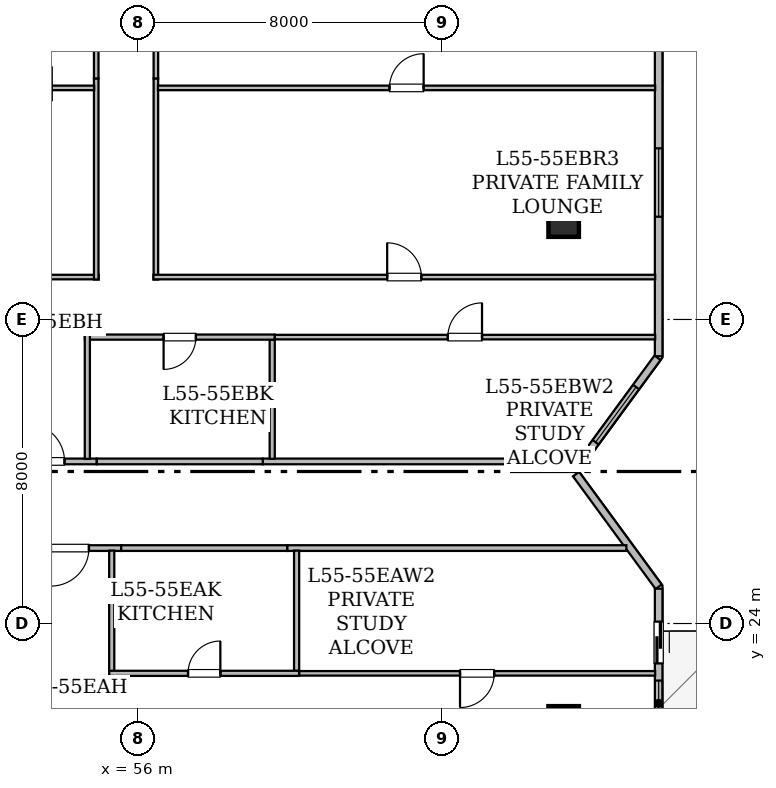
"""IFC4 building model, lengths in metres.
Left out: names, types, materials, properties, quantities, classifications, styles, units other than length and angle.
Written with IfcOpenShell. Run it as: python <this file> out.ifc"""

import sys

from ifc_helpers import new_model, si_unit, direction, frame, frame_2d, origin, origin_2d, place, context, subcontext, project, spatial, rectangle, hollow_rectangle, extrude, element, fill, save


model = new_model("IFC4")
c1 = context("Model", 3, precision=1e-05, world=origin(), true_north=direction((0.0, 1.0)))
c2 = subcontext(c1, "Body", "Model", "MODEL_VIEW")
j1 = project(units=[si_unit("LENGTHUNIT", "METRE"), si_unit("PLANEANGLEUNIT", "RADIAN")], contexts=[c1])
p1 = place(None, origin())
s1 = spatial("IfcSite", under=j1, at=p1, CompositionType="ELEMENT")
p2 = place(p1, origin())
s2 = spatial("IfcBuilding", under=s1, at=p2, CompositionType="ELEMENT")
p3 = place(p2, frame((0.0, 0.0, 217.2)))
s3 = spatial("IfcBuildingStorey", under=s2, at=p3, CompositionType="ELEMENT", Elevation=217.2)
for number, where, z_axis, x_axis in (
    (1, (67.2, 21.425, 0.025), (0.0, 0.0, 1.0), (1.0, 0.0, 0.0)),
    (2, (67.2, 34.575, 0.025), (0.0, 0.0, 1.0), (1.0, 0.0, 0.0)),
):
    element("IfcColumn", number, at=place(p3, frame(where, z_axis=z_axis, x_axis=x_axis)), inside=s3, PredefinedType="COLUMN", context=c2, shape_type="SweptSolid", body=[
        extrude(hollow_rectangle(XDim=0.8, YDim=0.8, WallThickness=0.04, at=origin_2d()), origin(), (0.0, 0.0, 1.0), 3.625),
    ])
p4 = place(p3, frame((69.7, 39.896, 0.0), z_axis=(0.0, 0.0, 1.0), x_axis=(0.0, -1.0, 0.0)))
e3 = element("IfcWall", 3, at=p4, inside=s3, PredefinedType="STANDARD", context=c2, shape_type="SweptSolid", body=[
    extrude(rectangle(XDim=8.863, YDim=0.2, at=frame_2d((4.432, 0.0))), origin(), (0.0, 0.0, 1.0), 3.43),
])
p5 = place(p4, frame((3.392, 0.0, 0.85)))
e4 = element("IfcOpeningElement", 4, at=p5, cuts=e3, PredefinedType="OPENING", context=c2, shape_type="SweptSolid", body=[
    extrude(rectangle(XDim=1.8, YDim=0.92, at=frame_2d((0.9, 0.46))), frame((0.0, 0.11, 0.0), z_axis=(0.0, -1.0, 0.0), x_axis=(1.0, 0.0, 0.0)), (0.0, 0.0, 1.0), 0.22),
])
p6 = place(p3, frame((69.67, 30.992, 0.0), z_axis=(0.0, 0.0, 1.0), x_axis=(-0.591320870733, -0.806436375566, 0.0)))
e5 = element("IfcWall", 5, at=p6, inside=s3, PredefinedType="STANDARD", context=c2, shape_type="SweptSolid", body=[
    extrude(rectangle(XDim=3.71, YDim=0.2, at=frame_2d((1.855, 0.0))), origin(), (0.0, 0.0, 1.0), 3.43),
])
p7 = place(p6, frame((0.955, 0.0, 0.85)))
e6 = element("IfcOpeningElement", 6, at=p7, cuts=e5, PredefinedType="OPENING", context=c2, shape_type="SweptSolid", body=[
    extrude(rectangle(XDim=1.8, YDim=0.92, at=frame_2d((0.9, 0.46))), frame((0.0, 0.11, 0.0), z_axis=(0.0, -1.0, 0.0), x_axis=(1.0, 0.0, 0.0)), (0.0, 0.0, 1.0), 0.22),
])
p8 = place(p3, frame((67.527, 27.931, 0.0), z_axis=(0.0, 0.0, 1.0), x_axis=(0.591248456881, -0.80648946815, 0.0)))
e7 = element("IfcWall", 7, at=p8, inside=s3, PredefinedType="STANDARD", context=c2, shape_type="SweptSolid", body=[
    extrude(rectangle(XDim=3.675, YDim=0.2, at=frame_2d((1.837, 0.0))), origin(), (0.0, 0.0, 1.0), 3.43),
])
p9 = place(p3, frame((69.7, 24.916, 0.0), z_axis=(0.0, 0.0, 1.0), x_axis=(0.0, -1.0, 0.0)))
e8 = element("IfcWall", 8, at=p9, inside=s3, PredefinedType="STANDARD", context=c2, shape_type="SweptSolid", body=[
    extrude(rectangle(XDim=8.875, YDim=0.2, at=frame_2d((4.438, 0.0))), origin(), (0.0, 0.0, 1.0), 3.43),
])
p10 = place(p9, frame((0.866, 0.0, 0.0)))
e9 = element("IfcOpeningElement", 9, at=p10, cuts=e8, PredefinedType="OPENING", context=c2, shape_type="SweptSolid", body=[
    extrude(rectangle(XDim=1.1, YDim=2.2, at=frame_2d((0.55, 1.1))), frame((0.0, 0.11, 0.0), z_axis=(0.0, -1.0, 0.0), x_axis=(1.0, 0.0, 0.0)), (0.0, 0.0, 1.0), 0.22),
])
p11 = place(p9, frame((2.417, 0.0, 0.78)))
e10 = element("IfcOpeningElement", 10, at=p11, cuts=e8, PredefinedType="OPENING", context=c2, shape_type="SweptSolid", body=[
    extrude(rectangle(XDim=1.2, YDim=1.5, at=frame_2d((0.6, 0.75))), frame((0.0, 0.11, 0.0), z_axis=(0.0, -1.0, 0.0), x_axis=(1.0, 0.0, 0.0)), (0.0, 0.0, 1.0), 0.22),
])
p12 = place(p9, frame((4.619, 0.0, 0.85)))
e11 = element("IfcOpeningElement", 11, at=p12, cuts=e8, PredefinedType="OPENING", context=c2, shape_type="SweptSolid", body=[
    extrude(rectangle(XDim=1.8, YDim=0.92, at=frame_2d((0.9, 0.46))), frame((0.0, 0.11, 0.0), z_axis=(0.0, -1.0, 0.0), x_axis=(1.0, 0.0, 0.0)), (0.0, 0.0, 1.0), 0.22),
])
p13 = place(p3, frame((68.85, 25.985, 0.0), z_axis=(0.0, 0.0, 1.0), x_axis=(-1.0, 0.0, 0.0)))
e12 = element("IfcWall", 12, at=p13, inside=s3, PredefinedType="STANDARD", context=c2, shape_type="SweptSolid", body=[
    extrude(rectangle(XDim=8.926, YDim=0.15, at=frame_2d((4.463, 0.0))), origin(), (0.0, 0.0, 1.0), 2.887),
])
p14 = place(p3, frame((55.557, 25.985, 0.0), z_axis=(0.0, 0.0, 1.0), x_axis=(-1.0, 0.0, 0.0)))
e13 = element("IfcWall", 13, at=p14, inside=s3, PredefinedType="STANDARD", context=c2, shape_type="SweptSolid", body=[
    extrude(rectangle(XDim=2.698, YDim=0.15, at=frame_2d((1.349, 0.0))), origin(), (0.0, 0.0, 1.0), 2.725),
])
p15 = place(p14, frame((0.849, 0.0, 0.0)))
e14 = element("IfcOpeningElement", 14, at=p15, cuts=e13, PredefinedType="OPENING", context=c2, shape_type="SweptSolid", body=[
    extrude(rectangle(XDim=1.0, YDim=2.15, at=frame_2d((0.5, 1.075))), frame((0.0, 0.085, 0.0), z_axis=(0.0, -1.0, 0.0), x_axis=(1.0, 0.0, 0.0)), (0.0, 0.0, 1.0), 0.17),
])
p16 = place(p3, frame((59.924, 25.985, 0.0), z_axis=(0.0, 0.0, 1.0), x_axis=(-1.0, 0.0, 0.0)))
e15 = element("IfcWall", 15, at=p16, inside=s3, PredefinedType="STANDARD", context=c2, shape_type="SweptSolid", body=[
    extrude(rectangle(XDim=4.367, YDim=0.15, at=frame_2d((2.184, 0.0))), origin(), (0.0, 0.0, 1.0), 3.43),
])
p17 = place(p3, frame((59.282, 28.265, 0.0), z_axis=(0.0, 0.0, 1.0), x_axis=(1.0, 0.0, 0.0)))
e16 = element("IfcWall", 16, at=p17, inside=s3, PredefinedType="STANDARD", context=c2, shape_type="SweptSolid", body=[
    extrude(rectangle(XDim=8.285, YDim=0.15, at=frame_2d((4.143, 0.0))), origin(), (0.0, 0.0, 1.0), 2.887),
])
p18 = place(p3, frame((52.217, 28.265, 0.0), z_axis=(0.0, 0.0, 1.0), x_axis=(1.0, 0.0, 0.0)))
e17 = element("IfcWall", 17, at=p18, inside=s3, PredefinedType="STANDARD", context=c2, shape_type="SweptSolid", body=[
    extrude(rectangle(XDim=2.698, YDim=0.15, at=frame_2d((1.349, 0.0))), origin(), (0.0, 0.0, 1.0), 2.725),
])
p19 = place(p18, frame((0.849, 0.0, 0.0)))
e18 = element("IfcOpeningElement", 18, at=p19, cuts=e17, PredefinedType="OPENING", context=c2, shape_type="SweptSolid", body=[
    extrude(rectangle(XDim=1.0, YDim=2.15, at=frame_2d((0.5, 1.075))), frame((0.0, 0.085, 0.0), z_axis=(0.0, -1.0, 0.0), x_axis=(1.0, 0.0, 0.0)), (0.0, 0.0, 1.0), 0.17),
])
p20 = place(p3, frame((54.915, 28.265, 0.0), z_axis=(0.0, 0.0, 1.0), x_axis=(1.0, 0.0, 0.0)))
e19 = element("IfcWall", 19, at=p20, inside=s3, PredefinedType="STANDARD", context=c2, shape_type="SweptSolid", body=[
    extrude(rectangle(XDim=4.367, YDim=0.15, at=frame_2d((2.184, 0.0))), origin(), (0.0, 0.0, 1.0), 3.43),
])
p21 = place(p3, frame((69.608, 22.689, 0.0), z_axis=(0.0, 0.0, 1.0), x_axis=(-1.0, 0.0, 0.0)))
e20 = element("IfcWall", 20, at=p21, inside=s3, PredefinedType="PARTITIONING", context=c2, shape_type="SweptSolid", body=[
    extrude(rectangle(XDim=9.37, YDim=0.12, at=frame_2d((4.685, 0.0))), origin(), (0.0, 0.0, 1.0), 2.887),
])
p22 = place(p21, frame((4.235, 0.0, 0.0)))
e21 = element("IfcOpeningElement", 21, at=p22, cuts=e20, PredefinedType="OPENING", context=c2, shape_type="SweptSolid", body=[
    extrude(rectangle(XDim=0.9, YDim=2.1, at=frame_2d((0.45, 1.05))), frame((0.0, 0.07, 0.0), z_axis=(0.0, -1.0, 0.0), x_axis=(1.0, 0.0, 0.0)), (0.0, 0.0, 1.0), 0.14),
])
p23 = place(p3, frame((60.173, 22.754, 0.0), z_axis=(0.0, 0.0, 1.0), x_axis=(0.0, 1.0, 0.0)))
e22 = element("IfcWall", 22, at=p23, inside=s3, PredefinedType="PARTITIONING", context=c2, shape_type="SweptSolid", body=[
    extrude(rectangle(XDim=3.164, YDim=0.135, at=frame_2d((1.582, 0.0))), origin(), (0.0, 0.0, 1.0), 3.43),
])
p24 = place(p3, frame((55.308, 25.918, 0.0), z_axis=(0.0, 0.0, 1.0), x_axis=(0.0, -1.0, 0.0)))
e23 = element("IfcWall", 23, at=p24, inside=s3, PredefinedType="PARTITIONING", context=c2, shape_type="SweptSolid", body=[
    extrude(rectangle(XDim=3.294, YDim=0.135, at=frame_2d((1.647, 0.0))), origin(), (0.0, 0.0, 1.0), 3.43),
])
p25 = place(p3, frame((55.243, 22.689, 0.0), z_axis=(0.0, 0.0, 1.0), x_axis=(1.0, 0.0, 0.0)))
e24 = element("IfcWall", 24, at=p25, inside=s3, PredefinedType="PARTITIONING", context=c2, shape_type="SweptSolid", body=[
    extrude(rectangle(XDim=4.995, YDim=0.135, at=frame_2d((2.498, 0.0))), origin(), (0.0, 0.0, 1.0), 3.43),
])
p26 = place(p25, frame((2.073, 0.0, 0.0)))
e25 = element("IfcOpeningElement", 25, at=p26, cuts=e24, PredefinedType="OPENING", context=c2, shape_type="SweptSolid", body=[
    extrude(rectangle(XDim=0.85, YDim=2.1, at=frame_2d((0.425, 1.05))), frame((0.0, 0.077, 0.0), z_axis=(0.0, -1.0, 0.0), x_axis=(1.0, 0.0, 0.0)), (0.0, 0.0, 1.0), 0.155),
])
p27 = place(p3, frame((59.596, 31.536, 0.0), z_axis=(0.0, 0.0, 1.0), x_axis=(1.0, 0.0, 0.0)))
e26 = element("IfcWall", 26, at=p27, inside=s3, PredefinedType="PARTITIONING", context=c2, shape_type="SweptSolid", body=[
    extrude(rectangle(XDim=10.012, YDim=0.12, at=frame_2d((5.006, 0.0))), origin(), (0.0, 0.0, 1.0), 2.887),
])
p28 = place(p27, frame((4.556, 0.0, 0.0)))
e27 = element("IfcOpeningElement", 27, at=p28, cuts=e26, PredefinedType="OPENING", context=c2, shape_type="SweptSolid", body=[
    extrude(rectangle(XDim=0.9, YDim=2.1, at=frame_2d((0.45, 1.05))), frame((0.0, 0.07, 0.0), z_axis=(0.0, -1.0, 0.0), x_axis=(1.0, 0.0, 0.0)), (0.0, 0.0, 1.0), 0.14),
])
p29 = place(p3, frame((59.531, 28.332, 0.0), z_axis=(0.0, 0.0, 1.0), x_axis=(0.0, 1.0, 0.0)))
e28 = element("IfcWall", 28, at=p29, inside=s3, PredefinedType="PARTITIONING", context=c2, shape_type="SweptSolid", body=[
    extrude(rectangle(XDim=3.139, YDim=0.135, at=frame_2d((1.569, 0.0))), origin(), (0.0, 0.0, 1.0), 3.43),
])
p30 = place(p3, frame((59.596, 31.536, 0.0), z_axis=(0.0, 0.0, 1.0), x_axis=(-1.0, 0.0, 0.0)))
e29 = element("IfcWall", 29, at=p30, inside=s3, PredefinedType="PARTITIONING", context=c2, shape_type="SweptSolid", body=[
    extrude(rectangle(XDim=4.995, YDim=0.135, at=frame_2d((2.498, 0.0))), origin(), (0.0, 0.0, 1.0), 3.43),
])
p31 = place(p30, frame((2.073, 0.0, 0.0)))
e30 = element("IfcOpeningElement", 30, at=p31, cuts=e29, PredefinedType="OPENING", context=c2, shape_type="SweptSolid", body=[
    extrude(rectangle(XDim=0.85, YDim=2.1, at=frame_2d((0.425, 1.05))), frame((0.0, 0.077, 0.0), z_axis=(0.0, -1.0, 0.0), x_axis=(1.0, 0.0, 0.0)), (0.0, 0.0, 1.0), 0.155),
])
p32 = place(p3, frame((54.666, 31.601, 0.0), z_axis=(0.0, 0.0, 1.0), x_axis=(0.0, -1.0, 0.0)))
e31 = element("IfcWall", 31, at=p32, inside=s3, PredefinedType="PARTITIONING", context=c2, shape_type="SweptSolid", body=[
    extrude(rectangle(XDim=3.269, YDim=0.135, at=frame_2d((1.635, 0.0))), origin(), (0.0, 0.0, 1.0), 3.43),
])
p33 = place(p3, frame((41.682, 33.116, 0.0), z_axis=(0.0, 0.0, 1.0), x_axis=(1.0, 0.0, 0.0)))
e32 = element("IfcWall", 32, at=p33, inside=s3, PredefinedType="PARTITIONING", context=c2, shape_type="SweptSolid", body=[
    extrude(rectangle(XDim=13.283, YDim=0.12, at=frame_2d((6.642, 0.0))), origin(), (0.0, 0.0, 1.0), 2.725),
])
p34 = place(p33, frame((6.191, 0.0, 0.0)))
e33 = element("IfcOpeningElement", 33, at=p34, cuts=e32, PredefinedType="OPENING", context=c2, shape_type="SweptSolid", body=[
    extrude(rectangle(XDim=0.9, YDim=2.1, at=frame_2d((0.45, 1.05))), frame((0.0, 0.07, 0.0), z_axis=(0.0, -1.0, 0.0), x_axis=(1.0, 0.0, 0.0)), (0.0, 0.0, 1.0), 0.14),
])
p35 = place(p3, frame((54.9, 33.051, 0.0), z_axis=(0.0, 0.0, 1.0), x_axis=(0.0, 1.0, 0.0)))
e34 = element("IfcWall", 34, at=p35, inside=s3, PredefinedType="PARTITIONING", context=c2, shape_type="SweptSolid", body=[
    extrude(rectangle(XDim=5.291, YDim=0.12, at=frame_2d((2.646, 0.0))), origin(), (0.0, 0.0, 1.0), 2.725),
])
p36 = place(p3, frame((54.9, 38.342, 0.0), z_axis=(0.0, 0.0, 1.0), x_axis=(0.0, 1.0, 0.0)))
e35 = element("IfcWall", 35, at=p36, inside=s3, PredefinedType="PARTITIONING", context=c2, shape_type="SweptSolid", body=[
    extrude(rectangle(XDim=5.466, YDim=0.12, at=frame_2d((2.733, 0.0))), origin(), (0.0, 0.0, 1.0), 2.725),
])
p37 = place(p36, frame((2.283, 0.0, 0.0)))
e36 = element("IfcOpeningElement", 36, at=p37, cuts=e35, PredefinedType="OPENING", context=c2, shape_type="SweptSolid", body=[
    extrude(rectangle(XDim=0.9, YDim=2.1, at=frame_2d((0.45, 1.05))), frame((0.0, 0.07, 0.0), z_axis=(0.0, -1.0, 0.0), x_axis=(1.0, 0.0, 0.0)), (0.0, 0.0, 1.0), 0.14),
])
p38 = place(p3, frame((56.47, 38.342, 0.0), z_axis=(0.0, 0.0, 1.0), x_axis=(0.0, -1.0, 0.0)))
e37 = element("IfcWall", 37, at=p38, inside=s3, PredefinedType="PARTITIONING", context=c2, shape_type="SweptSolid", body=[
    extrude(rectangle(XDim=5.291, YDim=0.12, at=frame_2d((2.646, 0.0))), origin(), (0.0, 0.0, 1.0), 2.725),
])
p39 = place(p3, frame((56.405, 33.116, 0.0), z_axis=(0.0, 0.0, 1.0), x_axis=(1.0, 0.0, 0.0)))
e38 = element("IfcWall", 38, at=p39, inside=s3, PredefinedType="PARTITIONING", context=c2, shape_type="SweptSolid", body=[
    extrude(rectangle(XDim=13.203, YDim=0.12, at=frame_2d((6.602, 0.0))), origin(), (0.0, 0.0, 1.0), 2.887),
])
p40 = place(p39, frame((6.151, 0.0, 0.0)))
e39 = element("IfcOpeningElement", 39, at=p40, cuts=e38, PredefinedType="OPENING", context=c2, shape_type="SweptSolid", body=[
    extrude(rectangle(XDim=0.9, YDim=2.1, at=frame_2d((0.45, 1.05))), frame((0.0, 0.07, 0.0), z_axis=(0.0, -1.0, 0.0), x_axis=(1.0, 0.0, 0.0)), (0.0, 0.0, 1.0), 0.14),
])
p41 = place(p3, frame((56.47, 43.808, 0.0), z_axis=(0.0, 0.0, 1.0), x_axis=(0.0, -1.0, 0.0)))
e40 = element("IfcWall", 40, at=p41, inside=s3, PredefinedType="PARTITIONING", context=c2, shape_type="SweptSolid", body=[
    extrude(rectangle(XDim=5.466, YDim=0.12, at=frame_2d((2.733, 0.0))), origin(), (0.0, 0.0, 1.0), 2.725),
])
p42 = place(p41, frame((2.283, 0.0, 0.0)))
e41 = element("IfcOpeningElement", 41, at=p42, cuts=e40, PredefinedType="OPENING", context=c2, shape_type="SweptSolid", body=[
    extrude(rectangle(XDim=0.9, YDim=2.1, at=frame_2d((0.45, 1.05))), frame((0.0, 0.07, 0.0), z_axis=(0.0, -1.0, 0.0), x_axis=(1.0, 0.0, 0.0)), (0.0, 0.0, 1.0), 0.14),
])
p43 = place(p3, frame((41.682, 38.093, 0.0), z_axis=(0.0, 0.0, 1.0), x_axis=(1.0, 0.0, 0.0)))
e42 = element("IfcWall", 42, at=p43, inside=s3, PredefinedType="PARTITIONING", context=c2, shape_type="SweptSolid", body=[
    extrude(rectangle(XDim=13.164, YDim=0.12, at=frame_2d((6.582, 0.0))), origin(), (0.0, 0.0, 1.0), 2.725),
])
p44 = place(p43, frame((6.132, 0.0, 0.0)))
e43 = element("IfcOpeningElement", 43, at=p44, cuts=e42, PredefinedType="OPENING", context=c2, shape_type="SweptSolid", body=[
    extrude(rectangle(XDim=0.9, YDim=2.1, at=frame_2d((0.45, 1.05))), frame((0.0, 0.07, 0.0), z_axis=(0.0, -1.0, 0.0), x_axis=(1.0, 0.0, 0.0)), (0.0, 0.0, 1.0), 0.14),
])
p45 = place(p3, frame((56.524, 38.093, 0.0), z_axis=(0.0, 0.0, 1.0), x_axis=(1.0, 0.0, 0.0)))
e44 = element("IfcWall", 44, at=p45, inside=s3, PredefinedType="PARTITIONING", context=c2, shape_type="SweptSolid", body=[
    extrude(rectangle(XDim=13.084, YDim=0.12, at=frame_2d((6.542, 0.0))), origin(), (0.0, 0.0, 1.0), 2.887),
])
p46 = place(p45, frame((6.092, 0.0, 0.0)))
e45 = element("IfcOpeningElement", 45, at=p46, cuts=e44, PredefinedType="OPENING", context=c2, shape_type="SweptSolid", body=[
    extrude(rectangle(XDim=0.9, YDim=2.1, at=frame_2d((0.45, 1.05))), frame((0.0, 0.07, 0.0), z_axis=(0.0, -1.0, 0.0), x_axis=(1.0, 0.0, 0.0)), (0.0, 0.0, 1.0), 0.14),
])
p47 = place(p10, origin())
e46 = element("IfcDoor", 46, at=p47, inside=s3, OperationType="SLIDING_TO_LEFT", PredefinedType="DOOR", context=c2, shape_type="SweptSolid", body=[
    extrude(rectangle(XDim=1.1, YDim=2.2, at=frame_2d((0.55, 1.1))), frame((0.0, 0.025, 0.0), z_axis=(0.0, -1.0, 0.0), x_axis=(1.0, 0.0, 0.0)), (0.0, 0.0, 1.0), 0.05),
])
fill(e9, e46)
p48 = place(p11, origin())
e47 = element("IfcWindow", 47, at=p48, inside=s3, PartitioningType="SINGLE_PANEL", PredefinedType="WINDOW", context=c2, shape_type="SweptSolid", body=[
    extrude(rectangle(XDim=1.2, YDim=1.5, at=frame_2d((0.6, 0.75))), frame((0.0, 0.03, 0.0), z_axis=(0.0, -1.0, 0.0), x_axis=(1.0, 0.0, 0.0)), (0.0, 0.0, 1.0), 0.06),
])
fill(e10, e47)
p49 = place(p7, origin())
e48 = element("IfcWindow", 48, at=p49, inside=s3, PartitioningType="SINGLE_PANEL", PredefinedType="WINDOW", context=c2, shape_type="SweptSolid", body=[
    extrude(rectangle(XDim=1.8, YDim=0.92, at=frame_2d((0.9, 0.46))), frame((0.0, 0.03, 0.0), z_axis=(0.0, -1.0, 0.0), x_axis=(1.0, 0.0, 0.0)), (0.0, 0.0, 1.0), 0.06),
])
fill(e6, e48)
p50 = place(p5, origin())
e49 = element("IfcWindow", 49, at=p50, inside=s3, PartitioningType="SINGLE_PANEL", PredefinedType="WINDOW", context=c2, shape_type="SweptSolid", body=[
    extrude(rectangle(XDim=1.8, YDim=0.92, at=frame_2d((0.9, 0.46))), frame((0.0, 0.03, 0.0), z_axis=(0.0, -1.0, 0.0), x_axis=(1.0, 0.0, 0.0)), (0.0, 0.0, 1.0), 0.06),
])
fill(e4, e49)
p51 = place(p15, origin())
e50 = element("IfcDoor", 50, at=p51, inside=s3, OperationType="SINGLE_SWING_RIGHT", PredefinedType="DOOR", context=c2, shape_type="SweptSolid", body=[
    extrude(rectangle(XDim=1.0, YDim=2.15, at=frame_2d((0.5, 1.075))), frame((0.0, 0.025, 0.0), z_axis=(0.0, -1.0, 0.0), x_axis=(1.0, 0.0, 0.0)), (0.0, 0.0, 1.0), 0.05),
])
fill(e14, e50)
p52 = place(p19, origin())
e51 = element("IfcDoor", 51, at=p52, inside=s3, OperationType="SINGLE_SWING_LEFT", PredefinedType="DOOR", context=c2, shape_type="SweptSolid", body=[
    extrude(rectangle(XDim=1.0, YDim=2.15, at=frame_2d((0.5, 1.075))), frame((0.0, 0.025, 0.0), z_axis=(0.0, -1.0, 0.0), x_axis=(1.0, 0.0, 0.0)), (0.0, 0.0, 1.0), 0.05),
])
fill(e18, e51)
p53 = place(p22, origin())
e52 = element("IfcDoor", 52, at=p53, inside=s3, OperationType="SINGLE_SWING_RIGHT", PredefinedType="DOOR", context=c2, shape_type="SweptSolid", body=[
    extrude(rectangle(XDim=0.9, YDim=2.1, at=frame_2d((0.45, 1.05))), frame((0.0, 0.025, 0.0), z_axis=(0.0, -1.0, 0.0), x_axis=(1.0, 0.0, 0.0)), (0.0, 0.0, 1.0), 0.05),
])
fill(e21, e52)
p54 = place(p26, origin())
e53 = element("IfcDoor", 53, at=p54, inside=s3, OperationType="SINGLE_SWING_RIGHT", PredefinedType="DOOR", context=c2, shape_type="SweptSolid", body=[
    extrude(rectangle(XDim=0.85, YDim=2.1, at=frame_2d((0.425, 1.05))), frame((0.0, 0.025, 0.0), z_axis=(0.0, -1.0, 0.0), x_axis=(1.0, 0.0, 0.0)), (0.0, 0.0, 1.0), 0.05),
])
fill(e25, e53)
p55 = place(p28, origin())
e54 = element("IfcDoor", 54, at=p55, inside=s3, OperationType="SINGLE_SWING_RIGHT", PredefinedType="DOOR", context=c2, shape_type="SweptSolid", body=[
    extrude(rectangle(XDim=0.9, YDim=2.1, at=frame_2d((0.45, 1.05))), frame((0.0, 0.025, 0.0), z_axis=(0.0, -1.0, 0.0), x_axis=(1.0, 0.0, 0.0)), (0.0, 0.0, 1.0), 0.05),
])
fill(e27, e54)
p56 = place(p31, origin())
e55 = element("IfcDoor", 55, at=p56, inside=s3, OperationType="SINGLE_SWING_RIGHT", PredefinedType="DOOR", context=c2, shape_type="SweptSolid", body=[
    extrude(rectangle(XDim=0.85, YDim=2.1, at=frame_2d((0.425, 1.05))), frame((0.0, 0.025, 0.0), z_axis=(0.0, -1.0, 0.0), x_axis=(1.0, 0.0, 0.0)), (0.0, 0.0, 1.0), 0.05),
])
fill(e30, e55)
p57 = place(p40, origin())
e56 = element("IfcDoor", 56, at=p57, inside=s3, OperationType="SINGLE_SWING_LEFT", PredefinedType="DOOR", context=c2, shape_type="SweptSolid", body=[
    extrude(rectangle(XDim=0.9, YDim=2.1, at=frame_2d((0.45, 1.05))), frame((0.0, 0.025, 0.0), z_axis=(0.0, -1.0, 0.0), x_axis=(1.0, 0.0, 0.0)), (0.0, 0.0, 1.0), 0.05),
])
fill(e39, e56)
p58 = place(p46, origin())
e57 = element("IfcDoor", 57, at=p58, inside=s3, OperationType="SINGLE_SWING_RIGHT", PredefinedType="DOOR", context=c2, shape_type="SweptSolid", body=[
    extrude(rectangle(XDim=0.9, YDim=2.1, at=frame_2d((0.45, 1.05))), frame((0.0, 0.025, 0.0), z_axis=(0.0, -1.0, 0.0), x_axis=(1.0, 0.0, 0.0)), (0.0, 0.0, 1.0), 0.05),
])
fill(e45, e57)
save(model, sys.argv[1])
